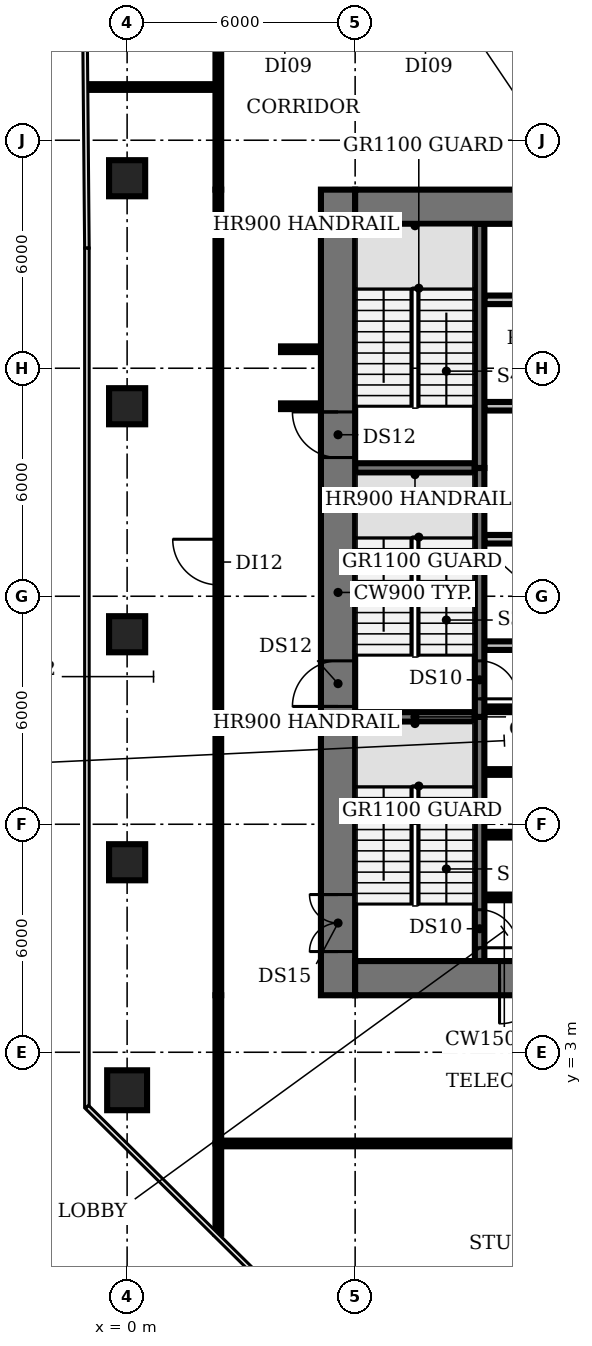
"""IFC4 building model, lengths in metres.
Left out: names, types, materials, properties, quantities, classifications, styles, units other than length and angle.
Written with IfcOpenShell. Run it as: python <this file> out.ifc"""

import sys

from ifc_helpers import new_model, si_unit, direction, frame, frame_2d, origin, origin_2d, place, context, subcontext, project, spatial, rectangle, circle, extrude, element, fill, save


model = new_model("IFC4")
c1 = context("Model", 3, precision=1e-05, world=origin(), true_north=direction((0.0, 1.0)))
c2 = subcontext(c1, "Body", "Model", "MODEL_VIEW")
j1 = project(units=[si_unit("LENGTHUNIT", "METRE"), si_unit("PLANEANGLEUNIT", "RADIAN")], contexts=[c1])
p1 = place(None, origin())
s1 = spatial("IfcSite", under=j1, at=p1, CompositionType="ELEMENT")
p2 = place(p1, origin())
s2 = spatial("IfcBuilding", under=s1, at=p2, CompositionType="ELEMENT")
p3 = place(p2, frame((0.0, 0.0, 54.2)))
s3 = spatial("IfcBuildingStorey", under=s2, at=p3, CompositionType="ELEMENT", Elevation=54.2)
p4 = place(p3, frame((0.0, 2.0, 0.0), z_axis=(0.0, 0.0, 1.0), x_axis=(1.0, 0.0, 0.0)))
e1 = element("IfcColumn", 1, at=p4, inside=s3, PredefinedType="COLUMN", context=c2, shape_type="SweptSolid", body=[
    extrude(circle(Radius=0.525, at=origin_2d()), origin(), (0.0, 0.0, 1.0), 3.85),
])
for number, where, z_axis, x_axis in (
    (2, (0.0, 8.0, 0.0), (0.0, 0.0, 1.0), (1.0, 0.0, 0.0)),
    (3, (0.0, 14.0, 0.0), (0.0, 0.0, 1.0), (1.0, 0.0, 0.0)),
    (4, (0.0, 20.0, 0.0), (0.0, 0.0, 1.0), (1.0, 0.0, 0.0)),
    (5, (0.0, 26.0, 0.0), (0.0, 0.0, 1.0), (1.0, 0.0, 0.0)),
):
    element("IfcColumn", number, at=place(p3, frame(where, z_axis=z_axis, x_axis=x_axis)), inside=s3, PredefinedType="COLUMN", context=c2, shape_type="SweptSolid", body=[
        extrude(rectangle(XDim=0.95, YDim=0.95, at=origin_2d()), origin(), (0.0, 0.0, 1.0), 3.85),
    ])
for number, where, z_axis, x_axis in (
    (6, (9.4, 7.075, 0.0), (0.0, 0.0, 1.0), (1.0, 0.0, 0.0)),
    (7, (9.4, 8.725, 0.0), (0.0, 0.0, 1.0), (1.0, 0.0, 0.0)),
    (8, (9.4, 10.375, 0.0), (0.0, 0.0, 1.0), (1.0, 0.0, 0.0)),
):
    element("IfcWall", number, at=place(p3, frame(where, z_axis=z_axis, x_axis=x_axis)), inside=s3, PredefinedType="SHEAR", context=c2, shape_type="SweptSolid", body=[
        extrude(rectangle(XDim=1.05, YDim=0.15, at=frame_2d((0.525, 0.0))), origin(), (0.0, 0.0, 1.0), 3.85),
    ])
p5 = place(p3, frame((6.0, 11.825, 0.0), z_axis=(0.0, 0.0, 1.0), x_axis=(1.0, 0.0, 0.0)))
e9 = element("IfcWall", 9, at=p5, inside=s3, PredefinedType="SHEAR", context=c2, shape_type="SweptSolid", body=[
    extrude(rectangle(XDim=3.15, YDim=0.25, at=frame_2d((1.575, 0.0))), origin(), (0.0, 0.0, 1.0), 3.85),
])
p6 = place(p3, frame((9.4, 12.025, 0.0), z_axis=(0.0, 0.0, 1.0), x_axis=(1.0, 0.0, 0.0)))
e10 = element("IfcWall", 10, at=p6, inside=s3, PredefinedType="SHEAR", context=c2, shape_type="SweptSolid", body=[
    extrude(rectangle(XDim=1.05, YDim=0.15, at=frame_2d((0.525, 0.0))), origin(), (0.0, 0.0, 1.0), 3.85),
])
p7 = place(p3, frame((9.4, 13.7, 0.0), z_axis=(0.0, 0.0, 1.0), x_axis=(1.0, 0.0, 0.0)))
e11 = element("IfcWall", 11, at=p7, inside=s3, PredefinedType="PARTITIONING", context=c2, shape_type="SweptSolid", body=[
    extrude(rectangle(XDim=4.0, YDim=0.225, at=frame_2d((2.0, 0.0))), origin(), (0.0, 0.0, 1.0), 3.85),
])
p8 = place(p3, frame((9.4, 16.5, 0.0), z_axis=(0.0, 0.0, 1.0), x_axis=(1.0, 0.0, 0.0)))
e12 = element("IfcWall", 12, at=p8, inside=s3, PredefinedType="PARTITIONING", context=c2, shape_type="SweptSolid", body=[
    extrude(rectangle(XDim=14.6, YDim=0.225, at=frame_2d((7.3, 0.0))), origin(), (0.0, 0.0, 1.0), 3.85),
])
p9 = place(p8, frame((0.75, 0.0, 0.0)))
e13 = element("IfcOpeningElement", 13, at=p9, cuts=e12, PredefinedType="OPENING", context=c2, shape_type="SweptSolid", body=[
    extrude(rectangle(XDim=1.1, YDim=2.1, at=frame_2d((0.55, 1.05))), frame((0.0, 0.123, 0.0), z_axis=(0.0, -1.0, 0.0), x_axis=(1.0, 0.0, 0.0)), (0.0, 0.0, 1.0), 0.245),
])
p10 = place(p8, frame((3.55, 0.0, 0.0)))
e14 = element("IfcOpeningElement", 14, at=p10, cuts=e12, PredefinedType="OPENING", context=c2, shape_type="SweptSolid", body=[
    extrude(rectangle(XDim=1.1, YDim=2.1, at=frame_2d((0.55, 1.05))), frame((0.0, 0.123, 0.0), z_axis=(0.0, -1.0, 0.0), x_axis=(1.0, 0.0, 0.0)), (0.0, 0.0, 1.0), 0.245),
])
p11 = place(p8, frame((6.35, 0.0, 0.0)))
e15 = element("IfcOpeningElement", 15, at=p11, cuts=e12, PredefinedType="OPENING", context=c2, shape_type="SweptSolid", body=[
    extrude(rectangle(XDim=1.1, YDim=2.1, at=frame_2d((0.55, 1.05))), frame((0.0, 0.123, 0.0), z_axis=(0.0, -1.0, 0.0), x_axis=(1.0, 0.0, 0.0)), (0.0, 0.0, 1.0), 0.245),
])
p12 = place(p8, frame((9.15, 0.0, 0.0)))
e16 = element("IfcOpeningElement", 16, at=p12, cuts=e12, PredefinedType="OPENING", context=c2, shape_type="SweptSolid", body=[
    extrude(rectangle(XDim=1.1, YDim=2.1, at=frame_2d((0.55, 1.05))), frame((0.0, 0.123, 0.0), z_axis=(0.0, -1.0, 0.0), x_axis=(1.0, 0.0, 0.0)), (0.0, 0.0, 1.0), 0.245),
])
p13 = place(p8, frame((11.647, 0.0, 0.0)))
e17 = element("IfcOpeningElement", 17, at=p13, cuts=e12, PredefinedType="OPENING", context=c2, shape_type="SweptSolid", body=[
    extrude(rectangle(XDim=0.9, YDim=2.1, at=frame_2d((0.45, 1.05))), frame((0.0, 0.123, 0.0), z_axis=(0.0, -1.0, 0.0), x_axis=(1.0, 0.0, 0.0)), (0.0, 0.0, 1.0), 0.245),
])
p14 = place(p8, frame((13.423, 0.0, 0.0)))
e18 = element("IfcOpeningElement", 18, at=p14, cuts=e12, PredefinedType="OPENING", context=c2, shape_type="SweptSolid", body=[
    extrude(rectangle(XDim=0.9, YDim=2.1, at=frame_2d((0.45, 1.05))), frame((0.0, 0.123, 0.0), z_axis=(0.0, -1.0, 0.0), x_axis=(1.0, 0.0, 0.0)), (0.0, 0.0, 1.0), 0.245),
])
p15 = place(p3, frame((6.0, 18.375, 0.0), z_axis=(0.0, 0.0, 1.0), x_axis=(1.0, 0.0, 0.0)))
e19 = element("IfcWall", 19, at=p15, inside=s3, PredefinedType="SHEAR", context=c2, shape_type="SweptSolid", body=[
    extrude(rectangle(XDim=3.15, YDim=0.25, at=frame_2d((1.575, 0.0))), origin(), (0.0, 0.0, 1.0), 3.85),
])
p16 = place(p3, frame((24.0, 20.0, 0.0), z_axis=(0.0, 0.0, 1.0), x_axis=(-1.0, 0.0, 0.0)))
e20 = element("IfcWall", 20, at=p16, inside=s3, PredefinedType="PARTITIONING", context=c2, shape_type="SweptSolid", body=[
    extrude(rectangle(XDim=14.6, YDim=0.225, at=frame_2d((7.3, 0.0))), origin(), (0.0, 0.0, 1.0), 3.85),
])
p17 = place(p16, frame((12.5, 0.0, 0.0)))
e21 = element("IfcOpeningElement", 21, at=p17, cuts=e20, PredefinedType="OPENING", context=c2, shape_type="SweptSolid", body=[
    extrude(rectangle(XDim=1.0, YDim=2.1, at=frame_2d((0.5, 1.05))), frame((0.0, 0.123, 0.0), z_axis=(0.0, -1.0, 0.0), x_axis=(1.0, 0.0, 0.0)), (0.0, 0.0, 1.0), 0.245),
])
p18 = place(p16, frame((8.825, 0.0, 0.0)))
e22 = element("IfcOpeningElement", 22, at=p18, cuts=e20, PredefinedType="OPENING", context=c2, shape_type="SweptSolid", body=[
    extrude(rectangle(XDim=1.0, YDim=2.1, at=frame_2d((0.5, 1.05))), frame((0.0, 0.123, 0.0), z_axis=(0.0, -1.0, 0.0), x_axis=(1.0, 0.0, 0.0)), (0.0, 0.0, 1.0), 0.245),
])
p19 = place(p16, frame((4.925, 0.0, 0.0)))
e23 = element("IfcOpeningElement", 23, at=p19, cuts=e20, PredefinedType="OPENING", context=c2, shape_type="SweptSolid", body=[
    extrude(rectangle(XDim=1.0, YDim=2.1, at=frame_2d((0.5, 1.05))), frame((0.0, 0.123, 0.0), z_axis=(0.0, -1.0, 0.0), x_axis=(1.0, 0.0, 0.0)), (0.0, 0.0, 1.0), 0.245),
])
p20 = place(p16, frame((2.137, 0.0, 0.0)))
e24 = element("IfcOpeningElement", 24, at=p20, cuts=e20, PredefinedType="OPENING", context=c2, shape_type="SweptSolid", body=[
    extrude(rectangle(XDim=0.9, YDim=2.1, at=frame_2d((0.45, 1.05))), frame((0.0, 0.123, 0.0), z_axis=(0.0, -1.0, 0.0), x_axis=(1.0, 0.0, 0.0)), (0.0, 0.0, 1.0), 0.245),
])
p21 = place(p16, frame((0.363, 0.0, 0.0)))
e25 = element("IfcOpeningElement", 25, at=p21, cuts=e20, PredefinedType="OPENING", context=c2, shape_type="SweptSolid", body=[
    extrude(rectangle(XDim=0.9, YDim=2.1, at=frame_2d((0.45, 1.05))), frame((0.0, 0.123, 0.0), z_axis=(0.0, -1.0, 0.0), x_axis=(1.0, 0.0, 0.0)), (0.0, 0.0, 1.0), 0.245),
])
p22 = place(p3, frame((9.4, 22.8, 0.0), z_axis=(0.0, 0.0, 1.0), x_axis=(1.0, 0.0, 0.0)))
e26 = element("IfcWall", 26, at=p22, inside=s3, PredefinedType="PARTITIONING", context=c2, shape_type="SweptSolid", body=[
    extrude(rectangle(XDim=14.6, YDim=0.225, at=frame_2d((7.3, 0.0))), origin(), (0.0, 0.0, 1.0), 3.85),
])
p23 = place(p3, frame((9.275, 11.825, 0.0), z_axis=(0.0, 0.0, 1.0), x_axis=(0.0, -1.0, 0.0)))
e27 = element("IfcWall", 27, at=p23, inside=s3, PredefinedType="SHEAR", context=c2, shape_type="SweptSolid", body=[
    extrude(rectangle(XDim=6.425, YDim=0.25, at=frame_2d((3.212, 0.0))), origin(), (0.0, 0.0, 1.0), 3.85),
])
p24 = place(p23, frame((5.075, 0.0, 0.0)))
e28 = element("IfcOpeningElement", 28, at=p24, cuts=e27, PredefinedType="OPENING", context=c2, shape_type="SweptSolid", body=[
    extrude(rectangle(XDim=1.0, YDim=2.1, at=frame_2d((0.5, 1.05))), frame((0.0, 0.135, 0.0), z_axis=(0.0, -1.0, 0.0), x_axis=(1.0, 0.0, 0.0)), (0.0, 0.0, 1.0), 0.27),
])
p25 = place(p3, frame((9.275, 18.375, 0.0), z_axis=(0.0, 0.0, 1.0), x_axis=(0.0, -1.0, 0.0)))
e29 = element("IfcWall", 29, at=p25, inside=s3, PredefinedType="SHEAR", context=c2, shape_type="SweptSolid", body=[
    extrude(rectangle(XDim=6.55, YDim=0.25, at=frame_2d((3.275, 0.0))), origin(), (0.0, 0.0, 1.0), 3.85),
])
p26 = place(p25, frame((5.075, 0.0, 0.0)))
e30 = element("IfcOpeningElement", 30, at=p26, cuts=e29, PredefinedType="OPENING", context=c2, shape_type="SweptSolid", body=[
    extrude(rectangle(XDim=1.0, YDim=2.1, at=frame_2d((0.5, 1.05))), frame((0.0, 0.135, 0.0), z_axis=(0.0, -1.0, 0.0), x_axis=(1.0, 0.0, 0.0)), (0.0, 0.0, 1.0), 0.27),
])
p27 = place(p3, frame((9.275, 18.375, 0.0), z_axis=(0.0, 0.0, 1.0), x_axis=(0.0, 1.0, 0.0)))
e31 = element("IfcWall", 31, at=p27, inside=s3, PredefinedType="SHEAR", context=c2, shape_type="SweptSolid", body=[
    extrude(rectangle(XDim=6.425, YDim=0.25, at=frame_2d((3.212, 0.0))), origin(), (0.0, 0.0, 1.0), 3.85),
])
p28 = place(p3, frame((5.55, 4.5, 0.0), z_axis=(0.0, 0.0, 1.0), x_axis=(0.0, 1.0, 0.0)))
e32 = element("IfcWall", 32, at=p28, inside=s3, PredefinedType="SHEAR", context=c2, shape_type="SweptSolid", body=[
    extrude(rectangle(XDim=21.2, YDim=0.9, at=frame_2d((10.6, 0.0))), origin(), (0.0, 0.0, 1.0), 3.85),
])
p29 = place(p28, frame((1.15, 0.0, 0.0)))
e33 = element("IfcOpeningElement", 33, at=p29, cuts=e32, PredefinedType="OPENING", context=c2, shape_type="SweptSolid", body=[
    extrude(rectangle(XDim=1.5, YDim=2.1, at=frame_2d((0.75, 1.05))), frame((0.0, 0.46, 0.0), z_axis=(0.0, -1.0, 0.0), x_axis=(1.0, 0.0, 0.0)), (0.0, 0.0, 1.0), 0.92),
])
p30 = place(p28, frame((7.6, 0.0, 0.0)))
e34 = element("IfcOpeningElement", 34, at=p30, cuts=e32, PredefinedType="OPENING", context=c2, shape_type="SweptSolid", body=[
    extrude(rectangle(XDim=1.2, YDim=2.1, at=frame_2d((0.6, 1.05))), frame((0.0, 0.46, 0.0), z_axis=(0.0, -1.0, 0.0), x_axis=(1.0, 0.0, 0.0)), (0.0, 0.0, 1.0), 0.92),
])
p31 = place(p28, frame((14.15, 0.0, 0.0)))
e35 = element("IfcOpeningElement", 35, at=p31, cuts=e32, PredefinedType="OPENING", context=c2, shape_type="SweptSolid", body=[
    extrude(rectangle(XDim=1.2, YDim=2.1, at=frame_2d((0.6, 1.05))), frame((0.0, 0.46, 0.0), z_axis=(0.0, -1.0, 0.0), x_axis=(1.0, 0.0, 0.0)), (0.0, 0.0, 1.0), 0.92),
])
p32 = place(p3, frame((24.0, 4.95, 0.0), z_axis=(0.0, 0.0, 1.0), x_axis=(-1.0, 0.0, 0.0)))
e36 = element("IfcWall", 36, at=p32, inside=s3, PredefinedType="SHEAR", context=c2, shape_type="SweptSolid", body=[
    extrude(rectangle(XDim=18.0, YDim=0.9, at=frame_2d((9.0, 0.0))), origin(), (0.0, 0.0, 1.0), 3.85),
])
p33 = place(p32, frame((13.0, 0.0, 0.0)))
e37 = element("IfcOpeningElement", 37, at=p33, cuts=e36, PredefinedType="OPENING", context=c2, shape_type="SweptSolid", body=[
    extrude(rectangle(XDim=1.2, YDim=2.1, at=frame_2d((0.6, 1.05))), frame((0.0, 0.46, 0.0), z_axis=(0.0, -1.0, 0.0), x_axis=(1.0, 0.0, 0.0)), (0.0, 0.0, 1.0), 0.92),
])
p34 = place(p32, frame((4.9, 0.0, 0.0)))
e38 = element("IfcOpeningElement", 38, at=p34, cuts=e36, PredefinedType="OPENING", context=c2, shape_type="SweptSolid", body=[
    extrude(rectangle(XDim=1.0, YDim=2.1, at=frame_2d((0.5, 1.05))), frame((0.0, 0.46, 0.0), z_axis=(0.0, -1.0, 0.0), x_axis=(1.0, 0.0, 0.0)), (0.0, 0.0, 1.0), 0.92),
])
p35 = place(p3, frame((6.0, 25.25, 0.0), z_axis=(0.0, 0.0, 1.0), x_axis=(1.0, 0.0, 0.0)))
e39 = element("IfcWall", 39, at=p35, inside=s3, PredefinedType="SHEAR", context=c2, shape_type="SweptSolid", body=[
    extrude(rectangle(XDim=18.0, YDim=0.9, at=frame_2d((9.0, 0.0))), origin(), (0.0, 0.0, 1.0), 3.85),
])
p36 = place(p3, frame((-1.04, 28.4, 0.0), z_axis=(0.0, 0.0, 1.0), x_axis=(1.0, 0.0, 0.0)))
e40 = element("IfcWall", 40, at=p36, inside=s3, PredefinedType="PARTITIONING", context=c2, shape_type="SweptSolid", body=[
    extrude(rectangle(XDim=3.44, YDim=0.15, at=frame_2d((1.72, 0.0))), origin(), (0.0, 0.0, 1.0), 2.83),
])
p37 = place(p3, frame((2.4, -1.777, 0.0), z_axis=(0.0, 0.0, 1.0), x_axis=(0.0, 1.0, 0.0)))
e41 = element("IfcWall", 41, at=p37, inside=s3, PredefinedType="PARTITIONING", context=c2, shape_type="SweptSolid", body=[
    extrude(rectangle(XDim=2.377, YDim=0.15, at=frame_2d((1.189, 0.0))), origin(), (0.0, 0.0, 1.0), 2.83),
])
p38 = place(p3, frame((2.4, 0.6, 0.0), z_axis=(0.0, 0.0, 1.0), x_axis=(0.0, 1.0, 0.0)))
e42 = element("IfcWall", 42, at=p38, inside=s3, PredefinedType="PARTITIONING", context=c2, shape_type="SweptSolid", body=[
    extrude(rectangle(XDim=3.9, YDim=0.15, at=frame_2d((1.95, 0.0))), origin(), (0.0, 0.0, 1.0), 2.83),
])
p39 = place(p3, frame((2.4, 4.5, 0.0), z_axis=(0.0, 0.0, 1.0), x_axis=(0.0, 1.0, 0.0)))
e43 = element("IfcWall", 43, at=p39, inside=s3, PredefinedType="PARTITIONING", context=c2, shape_type="SweptSolid", body=[
    extrude(rectangle(XDim=21.2, YDim=0.15, at=frame_2d((10.6, 0.0))), origin(), (0.0, 0.0, 1.0), 2.83),
])
p40 = place(p39, frame((10.8, 0.0, 0.0)))
e44 = element("IfcOpeningElement", 44, at=p40, cuts=e43, PredefinedType="OPENING", context=c2, shape_type="SweptSolid", body=[
    extrude(rectangle(XDim=1.2, YDim=2.1, at=frame_2d((0.6, 1.05))), frame((0.0, 0.085, 0.0), z_axis=(0.0, -1.0, 0.0), x_axis=(1.0, 0.0, 0.0)), (0.0, 0.0, 1.0), 0.17),
])
p41 = place(p3, frame((2.4, 25.7, 0.0), z_axis=(0.0, 0.0, 1.0), x_axis=(0.0, 1.0, 0.0)))
e45 = element("IfcWall", 45, at=p41, inside=s3, PredefinedType="PARTITIONING", context=c2, shape_type="SweptSolid", body=[
    extrude(rectangle(XDim=3.9, YDim=0.15, at=frame_2d((1.95, 0.0))), origin(), (0.0, 0.0, 1.0), 2.83),
])
for number, where, z_axis, x_axis in (
    (46, (4.05, 20.0, 0.0), (0.0, 0.0, 1.0), (1.0, 0.0, 0.0)),
    (47, (4.05, 21.5, 0.0), (0.0, 0.0, 1.0), (1.0, 0.0, 0.0)),
):
    element("IfcWall", number, at=place(p3, frame(where, z_axis=z_axis, x_axis=x_axis)), inside=s3, PredefinedType="PARTITIONING", context=c2, shape_type="SweptSolid", body=[
        extrude(rectangle(XDim=1.05, YDim=0.15, at=frame_2d((0.525, 0.0))), origin(), (0.0, 0.0, 1.0), 2.83),
    ])
p42 = place(p3, frame((27.6, 0.6, 0.0), z_axis=(0.0, 0.0, 1.0), x_axis=(-1.0, 0.0, 0.0)))
e48 = element("IfcWall", 48, at=p42, inside=s3, PredefinedType="PARTITIONING", context=c2, shape_type="SweptSolid", body=[
    extrude(rectangle(XDim=25.2, YDim=0.15, at=frame_2d((12.6, 0.0))), origin(), (0.0, 0.0, 1.0), 2.83),
])
p43 = place(p42, frame((12.1, 0.0, 0.0)))
e49 = element("IfcOpeningElement", 49, at=p43, cuts=e48, PredefinedType="OPENING", context=c2, shape_type="SweptSolid", body=[
    extrude(rectangle(XDim=1.2, YDim=2.1, at=frame_2d((0.6, 1.05))), frame((0.0, 0.085, 0.0), z_axis=(0.0, -1.0, 0.0), x_axis=(1.0, 0.0, 0.0)), (0.0, 0.0, 1.0), 0.17),
])
p44 = place(p24, origin())
e50 = element("IfcDoor", 50, at=p44, inside=s3, OperationType="SINGLE_SWING_RIGHT", PredefinedType="DOOR", context=c2, shape_type="SweptSolid", body=[
    extrude(rectangle(XDim=1.0, YDim=2.1, at=frame_2d((0.5, 1.05))), frame((0.0, 0.025, 0.0), z_axis=(0.0, -1.0, 0.0), x_axis=(1.0, 0.0, 0.0)), (0.0, 0.0, 1.0), 0.05),
])
fill(e28, e50)
p45 = place(p26, origin())
e51 = element("IfcDoor", 51, at=p45, inside=s3, OperationType="SINGLE_SWING_RIGHT", PredefinedType="DOOR", context=c2, shape_type="SweptSolid", body=[
    extrude(rectangle(XDim=1.0, YDim=2.1, at=frame_2d((0.5, 1.05))), frame((0.0, 0.025, 0.0), z_axis=(0.0, -1.0, 0.0), x_axis=(1.0, 0.0, 0.0)), (0.0, 0.0, 1.0), 0.05),
])
fill(e30, e51)
p46 = place(p29, origin())
e52 = element("IfcDoor", 52, at=p46, inside=s3, OperationType="DOUBLE_DOOR_SINGLE_SWING", PredefinedType="DOOR", context=c2, shape_type="SweptSolid", body=[
    extrude(rectangle(XDim=1.5, YDim=2.1, at=frame_2d((0.75, 1.05))), frame((0.0, 0.025, 0.0), z_axis=(0.0, -1.0, 0.0), x_axis=(1.0, 0.0, 0.0)), (0.0, 0.0, 1.0), 0.05),
])
fill(e33, e52)
p47 = place(p30, origin())
e53 = element("IfcDoor", 53, at=p47, inside=s3, OperationType="SINGLE_SWING_LEFT", PredefinedType="DOOR", context=c2, shape_type="SweptSolid", body=[
    extrude(rectangle(XDim=1.2, YDim=2.1, at=frame_2d((0.6, 1.05))), frame((0.0, 0.025, 0.0), z_axis=(0.0, -1.0, 0.0), x_axis=(1.0, 0.0, 0.0)), (0.0, 0.0, 1.0), 0.05),
])
fill(e34, e53)
p48 = place(p31, origin())
e54 = element("IfcDoor", 54, at=p48, inside=s3, OperationType="SINGLE_SWING_RIGHT", PredefinedType="DOOR", context=c2, shape_type="SweptSolid", body=[
    extrude(rectangle(XDim=1.2, YDim=2.1, at=frame_2d((0.6, 1.05))), frame((0.0, 0.025, 0.0), z_axis=(0.0, -1.0, 0.0), x_axis=(1.0, 0.0, 0.0)), (0.0, 0.0, 1.0), 0.05),
])
fill(e35, e54)
p49 = place(p33, origin())
e55 = element("IfcDoor", 55, at=p49, inside=s3, OperationType="SINGLE_SWING_RIGHT", PredefinedType="DOOR", context=c2, shape_type="SweptSolid", body=[
    extrude(rectangle(XDim=1.2, YDim=2.1, at=frame_2d((0.6, 1.05))), frame((0.0, 0.025, 0.0), z_axis=(0.0, -1.0, 0.0), x_axis=(1.0, 0.0, 0.0)), (0.0, 0.0, 1.0), 0.05),
])
fill(e37, e55)
p50 = place(p40, origin())
e56 = element("IfcDoor", 56, at=p50, inside=s3, OperationType="SINGLE_SWING_RIGHT", PredefinedType="DOOR", context=c2, shape_type="SweptSolid", body=[
    extrude(rectangle(XDim=1.2, YDim=2.1, at=frame_2d((0.6, 1.05))), frame((0.0, 0.025, 0.0), z_axis=(0.0, -1.0, 0.0), x_axis=(1.0, 0.0, 0.0)), (0.0, 0.0, 1.0), 0.05),
])
fill(e44, e56)
save(model, sys.argv[1])
